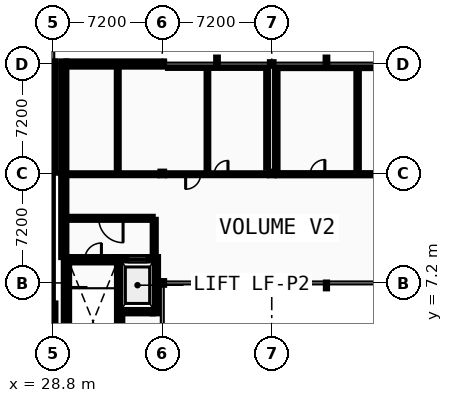
"""IFC4 building model, lengths in metres.
Left out: names, types, materials, properties, quantities, classifications, styles, units other than length and angle.
Written with IfcOpenShell. Run it as: python <this file> out.ifc"""

import sys

from ifc_helpers import new_model, si_unit, direction, frame, frame_2d, origin, origin_2d, place, context, subcontext, project, spatial, rectangle, i_section, extrude, element, fill, save


model = new_model("IFC4")
c1 = context("Model", 3, precision=1e-05, world=origin(), true_north=direction((0.0, 1.0)))
c2 = subcontext(c1, "Body", "Model", "MODEL_VIEW")
j1 = project(units=[si_unit("LENGTHUNIT", "METRE"), si_unit("PLANEANGLEUNIT", "RADIAN")], contexts=[c1])
p1 = place(None, origin())
s1 = spatial("IfcSite", under=j1, at=p1, CompositionType="ELEMENT")
p2 = place(p1, origin())
s2 = spatial("IfcBuilding", under=s1, at=p2, CompositionType="ELEMENT")
p3 = place(p2, frame((0.0, 0.0, 18.4)))
s3 = spatial("IfcBuildingStorey", under=s2, at=p3, CompositionType="ELEMENT", Elevation=18.4)
p4 = place(p3, frame((28.8, 21.6, 0.0), z_axis=(0.0, 0.0, 1.0), x_axis=(1.0, 0.0, 0.0)))
e1 = element("IfcColumn", 1, at=p4, inside=s3, PredefinedType="COLUMN", context=c2, shape_type="SweptSolid", body=[
    extrude(i_section(OverallWidth=0.3, OverallDepth=0.36, WebThickness=0.012, FlangeThickness=0.022, FilletRadius=0.027, at=origin_2d()), origin(), (0.0, 0.0, 1.0), 4.4),
])
for number, where, z_axis, x_axis in (
    (2, (29.52, 14.4, 0.0), (0.0, 0.0, 1.0), (1.0, 0.0, 0.0)),
    (3, (29.52, 21.6, 0.0), (0.0, 0.0, 1.0), (1.0, 0.0, 0.0)),
    (4, (36.0, 7.2, 0.0), (0.0, 0.0, 1.0), (1.0, 0.0, 0.0)),
    (5, (36.0, 14.4, 0.0), (0.0, 0.0, 1.0), (1.0, 0.0, 0.0)),
    (6, (36.0, 21.6, 0.0), (0.0, 0.0, 1.0), (1.0, 0.0, 0.0)),
    (7, (43.2, 7.2, 0.0), (0.0, 0.0, 1.0), (1.0, 0.0, 0.0)),
    (8, (43.2, 14.4, 0.0), (0.0, 0.0, 1.0), (1.0, 0.0, 0.0)),
    (9, (43.2, 21.6, 0.0), (0.0, 0.0, 1.0), (1.0, 0.0, 0.0)),
):
    element("IfcColumn", number, at=place(p3, frame(where, z_axis=z_axis, x_axis=x_axis)), inside=s3, PredefinedType="COLUMN", context=c2, shape_type="SweptSolid", body=[
        extrude(i_section(OverallWidth=0.24, OverallDepth=0.24, WebThickness=0.01, FlangeThickness=0.017, FilletRadius=0.021, at=origin_2d()), origin(), (0.0, 0.0, 1.0), 4.4),
    ])
p5 = place(p3, frame((28.8, -0.17, 0.0), z_axis=(0.0, 0.0, 1.0), x_axis=(0.0, 1.0, 0.0)))
e10 = element("IfcWall", 10, at=p5, inside=s3, PredefinedType="STANDARD", context=c2, shape_type="SweptSolid", body=[
    extrude(rectangle(XDim=6.02, YDim=0.34, at=frame_2d((3.01, 0.0))), origin(), (0.0, 0.0, 1.0), 4.215),
])
p6 = place(p5, frame((2.461, 0.0, 0.95)))
e11 = element("IfcOpeningElement", 11, at=p6, cuts=e10, PredefinedType="OPENING", context=c2, shape_type="SweptSolid", body=[
    extrude(rectangle(XDim=1.098, YDim=1.404, at=frame_2d((0.549, 0.702))), frame((0.0, 0.18, 0.0), z_axis=(0.0, -1.0, 0.0), x_axis=(1.0, 0.0, 0.0)), (0.0, 0.0, 1.0), 0.36),
])
p7 = place(p3, frame((28.8, 14.45, 0.0), z_axis=(0.0, 0.0, 1.0), x_axis=(0.0, 1.0, 0.0)))
e12 = element("IfcWall", 12, at=p7, inside=s3, PredefinedType="STANDARD", context=c2, shape_type="SweptSolid", body=[
    extrude(rectangle(XDim=7.15, YDim=0.34, at=frame_2d((3.575, 0.0))), origin(), (0.0, 0.0, 1.0), 4.215),
])
p8 = place(p7, frame((1.579, 0.0, 0.95)))
e13 = element("IfcOpeningElement", 13, at=p8, cuts=e12, PredefinedType="OPENING", context=c2, shape_type="SweptSolid", body=[
    extrude(rectangle(XDim=1.132, YDim=1.404, at=frame_2d((0.566, 0.702))), frame((0.0, 0.18, 0.0), z_axis=(0.0, -1.0, 0.0), x_axis=(1.0, 0.0, 0.0)), (0.0, 0.0, 1.0), 0.36),
])
p9 = place(p7, frame((4.439, 0.0, 0.95)))
e14 = element("IfcOpeningElement", 14, at=p9, cuts=e12, PredefinedType="OPENING", context=c2, shape_type="SweptSolid", body=[
    extrude(rectangle(XDim=1.132, YDim=1.404, at=frame_2d((0.566, 0.702))), frame((0.0, 0.18, 0.0), z_axis=(0.0, -1.0, 0.0), x_axis=(1.0, 0.0, 0.0)), (0.0, 0.0, 1.0), 0.36),
])
p10 = place(p3, frame((36.11, 21.6, 0.0), z_axis=(0.0, 0.0, 1.0), x_axis=(-1.0, 0.0, 0.0)))
e15 = element("IfcWall", 15, at=p10, inside=s3, PredefinedType="STANDARD", context=c2, shape_type="SweptSolid", body=[
    extrude(rectangle(XDim=6.42, YDim=0.34, at=frame_2d((3.21, 0.0))), origin(), (0.0, 0.0, 1.0), 4.035),
])
p11 = place(p3, frame((29.52, 14.4, 0.0), z_axis=(0.0, 0.0, 1.0), x_axis=(0.0, -1.0, 0.0)))
e16 = element("IfcWall", 16, at=p11, inside=s3, PredefinedType="STANDARD", context=c2, shape_type="SweptSolid", body=[
    extrude(rectangle(XDim=5.5, YDim=0.34, at=frame_2d((2.75, 0.0))), origin(), (0.0, 0.0, 1.0), 4.11),
])
p12 = place(p3, frame((29.52, 21.77, 0.0), z_axis=(0.0, 0.0, 1.0), x_axis=(0.0, -1.0, 0.0)))
e17 = element("IfcWall", 17, at=p12, inside=s3, PredefinedType="STANDARD", context=c2, shape_type="SweptSolid", body=[
    extrude(rectangle(XDim=7.37, YDim=0.34, at=frame_2d((3.685, 0.0))), origin(), (0.0, 0.0, 1.0), 4.11),
])
p13 = place(p12, frame((1.577, 0.0, 0.95)))
e18 = element("IfcOpeningElement", 18, at=p13, cuts=e17, PredefinedType="OPENING", context=c2, shape_type="SweptSolid", body=[
    extrude(rectangle(XDim=1.268, YDim=1.404, at=frame_2d((0.634, 0.702))), frame((0.0, 0.18, 0.0), z_axis=(0.0, -1.0, 0.0), x_axis=(1.0, 0.0, 0.0)), (0.0, 0.0, 1.0), 0.36),
])
p14 = place(p12, frame((4.525, 0.0, 0.95)))
e19 = element("IfcOpeningElement", 19, at=p14, cuts=e17, PredefinedType="OPENING", context=c2, shape_type="SweptSolid", body=[
    extrude(rectangle(XDim=1.268, YDim=1.404, at=frame_2d((0.634, 0.702))), frame((0.0, 0.18, 0.0), z_axis=(0.0, -1.0, 0.0), x_axis=(1.0, 0.0, 0.0)), (0.0, 0.0, 1.0), 0.36),
])
p15 = place(p3, frame((28.6, 5.85, 0.0), z_axis=(0.0, 0.0, 1.0), x_axis=(0.0, 1.0, 0.0)))
e20 = element("IfcWall", 20, at=p15, inside=s3, PredefinedType="SHEAR", context=c2, shape_type="SweptSolid", body=[
    extrude(rectangle(XDim=8.6, YDim=0.4, at=frame_2d((4.3, 0.0))), origin(), (0.0, 0.0, 1.0), 4.215),
])
p16 = place(p3, frame((29.87, 8.725, 0.0), z_axis=(0.0, 0.0, 1.0), x_axis=(1.0, 0.0, 0.0)))
e21 = element("IfcWall", 21, at=p16, inside=s3, PredefinedType="SHEAR", context=c2, shape_type="SweptSolid", body=[
    extrude(rectangle(XDim=3.15, YDim=0.35, at=frame_2d((1.575, 0.0))), origin(), (0.0, 0.0, 1.0), 4.18),
])
p17 = place(p16, frame((1.025, 0.0, 0.0)))
e22 = element("IfcOpeningElement", 22, at=p17, cuts=e21, PredefinedType="OPENING", context=c2, shape_type="SweptSolid", body=[
    extrude(rectangle(XDim=1.1, YDim=2.15, at=frame_2d((0.55, 1.075))), frame((0.0, 0.185, 0.0), z_axis=(0.0, -1.0, 0.0), x_axis=(1.0, 0.0, 0.0)), (0.0, 0.0, 1.0), 0.37),
])
p18 = place(p3, frame((29.695, 0.34, 0.0), z_axis=(0.0, 0.0, 1.0), x_axis=(0.0, 1.0, 0.0)))
e23 = element("IfcWall", 23, at=p18, inside=s3, PredefinedType="SHEAR", context=c2, shape_type="SweptSolid", body=[
    extrude(rectangle(XDim=8.56, YDim=0.35, at=frame_2d((4.28, 0.0))), origin(), (0.0, 0.0, 1.0), 4.18),
])
p19 = place(p3, frame((33.195, 0.4, 0.0), z_axis=(0.0, 0.0, 1.0), x_axis=(0.0, 1.0, 0.0)))
e24 = element("IfcWall", 24, at=p19, inside=s3, PredefinedType="SHEAR", context=c2, shape_type="SweptSolid", body=[
    extrude(rectangle(XDim=8.5, YDim=0.35, at=frame_2d((4.25, 0.0))), origin(), (0.0, 0.0, 1.0), 4.18),
])
p20 = place(p3, frame((33.37, 5.375, 0.0), z_axis=(0.0, 0.0, 1.0), x_axis=(1.0, 0.0, 0.0)))
e25 = element("IfcWall", 25, at=p20, inside=s3, PredefinedType="SHEAR", context=c2, shape_type="SweptSolid", body=[
    extrude(rectangle(XDim=2.0, YDim=0.35, at=frame_2d((1.0, 0.0))), origin(), (0.0, 0.0, 1.0), 4.18),
])
p21 = place(p3, frame((33.37, 8.725, 0.0), z_axis=(0.0, 0.0, 1.0), x_axis=(1.0, 0.0, 0.0)))
e26 = element("IfcWall", 26, at=p21, inside=s3, PredefinedType="SHEAR", context=c2, shape_type="SweptSolid", body=[
    extrude(rectangle(XDim=2.0, YDim=0.35, at=frame_2d((1.0, 0.0))), origin(), (0.0, 0.0, 1.0), 4.18),
])
p22 = place(p21, frame((0.4, 0.0, 0.0)))
e27 = element("IfcOpeningElement", 27, at=p22, cuts=e26, PredefinedType="OPENING", context=c2, shape_type="SweptSolid", body=[
    extrude(rectangle(XDim=1.2, YDim=2.2, at=frame_2d((0.6, 1.1))), frame((0.0, 0.185, 0.0), z_axis=(0.0, -1.0, 0.0), x_axis=(1.0, 0.0, 0.0)), (0.0, 0.0, 1.0), 0.37),
])
p23 = place(p3, frame((35.545, 5.2, 0.0), z_axis=(0.0, 0.0, 1.0), x_axis=(0.0, 1.0, 0.0)))
e28 = element("IfcWall", 28, at=p23, inside=s3, PredefinedType="SHEAR", context=c2, shape_type="SweptSolid", body=[
    extrude(rectangle(XDim=3.7, YDim=0.35, at=frame_2d((1.85, 0.0))), origin(), (0.0, 0.0, 1.0), 4.18),
])
p24 = place(p3, frame((29.87, 11.45, 0.0), z_axis=(0.0, 0.0, 1.0), x_axis=(1.0, 0.0, 0.0)))
e29 = element("IfcWall", 29, at=p24, inside=s3, PredefinedType="PARTITIONING", context=c2, shape_type="SweptSolid", body=[
    extrude(rectangle(XDim=5.5, YDim=0.2, at=frame_2d((2.75, 0.0))), origin(), (0.0, 0.0, 1.0), 4.18),
])
p25 = place(p24, frame((1.95, 0.0, 0.0)))
e30 = element("IfcOpeningElement", 30, at=p25, cuts=e29, PredefinedType="OPENING", context=c2, shape_type="SweptSolid", body=[
    extrude(rectangle(XDim=1.6, YDim=2.2, at=frame_2d((0.8, 1.1))), frame((0.0, 0.11, 0.0), z_axis=(0.0, -1.0, 0.0), x_axis=(1.0, 0.0, 0.0)), (0.0, 0.0, 1.0), 0.22),
])
p26 = place(p3, frame((35.47, 8.9, 0.0), z_axis=(0.0, 0.0, 1.0), x_axis=(0.0, 1.0, 0.0)))
e31 = element("IfcWall", 31, at=p26, inside=s3, PredefinedType="PARTITIONING", context=c2, shape_type="SweptSolid", body=[
    extrude(rectangle(XDim=2.45, YDim=0.2, at=frame_2d((1.225, 0.0))), origin(), (0.0, 0.0, 1.0), 4.18),
])
p27 = place(p3, frame((29.9, 14.35, 0.0), z_axis=(0.0, 0.0, 1.0), x_axis=(1.0, 0.0, 0.0)))
e32 = element("IfcWall", 32, at=p27, inside=s3, PredefinedType="PARTITIONING", context=c2, shape_type="SweptSolid", body=[
    extrude(rectangle(XDim=5.72, YDim=0.125, at=frame_2d((2.86, 0.0))), origin(), (0.0, 0.0, 1.0), 4.035),
])
p28 = place(p27, frame((1.72, 0.0, 0.0)))
e33 = element("IfcOpeningElement", 33, at=p28, cuts=e32, PredefinedType="OPENING", context=c2, shape_type="SweptSolid", body=[
    extrude(rectangle(XDim=1.0, YDim=2.1, at=frame_2d((0.5, 1.05))), frame((0.0, 0.073, 0.0), z_axis=(0.0, -1.0, 0.0), x_axis=(1.0, 0.0, 0.0)), (0.0, 0.0, 1.0), 0.145),
])
p29 = place(p3, frame((36.38, 14.35, 0.0), z_axis=(0.0, 0.0, 1.0), x_axis=(1.0, 0.0, 0.0)))
e34 = element("IfcWall", 34, at=p29, inside=s3, PredefinedType="PARTITIONING", context=c2, shape_type="SweptSolid", body=[
    extrude(rectangle(XDim=6.44, YDim=0.125, at=frame_2d((3.22, 0.0))), origin(), (0.0, 0.0, 1.0), 4.035),
])
p30 = place(p29, frame((3.04, 0.0, 0.0)))
e35 = element("IfcOpeningElement", 35, at=p30, cuts=e34, PredefinedType="OPENING", context=c2, shape_type="SweptSolid", body=[
    extrude(rectangle(XDim=0.9, YDim=2.1, at=frame_2d((0.45, 1.05))), frame((0.0, 0.073, 0.0), z_axis=(0.0, -1.0, 0.0), x_axis=(1.0, 0.0, 0.0)), (0.0, 0.0, 1.0), 0.145),
])
p31 = place(p29, frame((1.156, 0.0, 0.0)))
e36 = element("IfcOpeningElement", 36, at=p31, cuts=e34, PredefinedType="OPENING", context=c2, shape_type="SweptSolid", body=[
    extrude(rectangle(XDim=0.984, YDim=2.068, at=frame_2d((0.492, 1.034))), frame((0.0, 0.073, 0.0), z_axis=(0.0, -1.0, 0.0), x_axis=(1.0, 0.0, 0.0)), (0.0, 0.0, 1.0), 0.145),
])
p32 = place(p3, frame((43.58, 14.35, 0.0), z_axis=(0.0, 0.0, 1.0), x_axis=(1.0, 0.0, 0.0)))
e37 = element("IfcWall", 37, at=p32, inside=s3, PredefinedType="PARTITIONING", context=c2, shape_type="SweptSolid", body=[
    extrude(rectangle(XDim=6.44, YDim=0.142, at=frame_2d((3.22, 0.0))), origin(), (0.0, 0.0, 1.0), 4.035),
])
p33 = place(p32, frame((2.156, 0.0, 0.0)))
e38 = element("IfcOpeningElement", 38, at=p33, cuts=e37, PredefinedType="OPENING", context=c2, shape_type="SweptSolid", body=[
    extrude(rectangle(XDim=0.958, YDim=2.068, at=frame_2d((0.479, 1.034))), frame((0.0, 0.081, 0.0), z_axis=(0.0, -1.0, 0.0), x_axis=(1.0, 0.0, 0.0)), (0.0, 0.0, 1.0), 0.162),
])
p34 = place(p3, frame((36.38, 21.4, 0.0), z_axis=(0.0, 0.0, 1.0), x_axis=(1.0, 0.0, 0.0)))
e39 = element("IfcWall", 39, at=p34, inside=s3, PredefinedType="PARTITIONING", context=c2, shape_type="SweptSolid", body=[
    extrude(rectangle(XDim=6.44, YDim=0.11, at=frame_2d((3.22, 0.0))), origin(), (0.0, 0.0, 1.0), 4.035),
])
p35 = place(p3, frame((43.58, 21.4, 0.0), z_axis=(0.0, 0.0, 1.0), x_axis=(1.0, 0.0, 0.0)))
e40 = element("IfcWall", 40, at=p35, inside=s3, PredefinedType="PARTITIONING", context=c2, shape_type="SweptSolid", body=[
    extrude(rectangle(XDim=6.44, YDim=0.135, at=frame_2d((3.22, 0.0))), origin(), (0.0, 0.0, 1.0), 4.035),
])
p36 = place(p3, frame((33.07, 14.413, 0.0), z_axis=(0.0, 0.0, 1.0), x_axis=(0.0, 1.0, 0.0)))
e41 = element("IfcWall", 41, at=p36, inside=s3, PredefinedType="PARTITIONING", context=c2, shape_type="SweptSolid", body=[
    extrude(rectangle(XDim=6.987, YDim=0.125, at=frame_2d((3.494, 0.0))), origin(), (0.0, 0.0, 1.0), 4.18),
])
p37 = place(p3, frame((38.97, 14.413, 0.0), z_axis=(0.0, 0.0, 1.0), x_axis=(0.0, 1.0, 0.0)))
e42 = element("IfcWall", 42, at=p37, inside=s3, PredefinedType="PARTITIONING", context=c2, shape_type="SweptSolid", body=[
    extrude(rectangle(XDim=6.932, YDim=0.11, at=frame_2d((3.466, 0.0))), origin(), (0.0, 0.0, 1.0), 4.18),
])
p38 = place(p3, frame((42.9, 14.78, 0.0), z_axis=(0.0, 0.0, 1.0), x_axis=(0.0, 1.0, 0.0)))
e43 = element("IfcWall", 43, at=p38, inside=s3, PredefinedType="PARTITIONING", context=c2, shape_type="SweptSolid", body=[
    extrude(rectangle(XDim=6.44, YDim=0.125, at=frame_2d((3.22, 0.0))), origin(), (0.0, 0.0, 1.0), 4.18),
])
p39 = place(p3, frame((43.5, 14.78, 0.0), z_axis=(0.0, 0.0, 1.0), x_axis=(0.0, 1.0, 0.0)))
e44 = element("IfcWall", 44, at=p39, inside=s3, PredefinedType="PARTITIONING", context=c2, shape_type="SweptSolid", body=[
    extrude(rectangle(XDim=6.44, YDim=0.16, at=frame_2d((3.22, 0.0))), origin(), (0.0, 0.0, 1.0), 4.18),
])
p40 = place(p3, frame((48.85, 14.421, 0.0), z_axis=(0.0, 0.0, 1.0), x_axis=(0.0, 1.0, 0.0)))
e45 = element("IfcWall", 45, at=p40, inside=s3, PredefinedType="PARTITIONING", context=c2, shape_type="SweptSolid", body=[
    extrude(rectangle(XDim=6.912, YDim=0.16, at=frame_2d((3.456, 0.0))), origin(), (0.0, 0.0, 1.0), 4.18),
])
p41 = place(p8, origin())
e46 = element("IfcWindow", 46, at=p41, inside=s3, PartitioningType="SINGLE_PANEL", PredefinedType="WINDOW", context=c2, shape_type="SweptSolid", body=[
    extrude(rectangle(XDim=1.132, YDim=1.404, at=frame_2d((0.566, 0.702))), frame((0.0, 0.03, 0.0), z_axis=(0.0, -1.0, 0.0), x_axis=(1.0, 0.0, 0.0)), (0.0, 0.0, 1.0), 0.06),
])
fill(e13, e46)
p42 = place(p9, origin())
e47 = element("IfcWindow", 47, at=p42, inside=s3, PartitioningType="SINGLE_PANEL", PredefinedType="WINDOW", context=c2, shape_type="SweptSolid", body=[
    extrude(rectangle(XDim=1.132, YDim=1.404, at=frame_2d((0.566, 0.702))), frame((0.0, 0.03, 0.0), z_axis=(0.0, -1.0, 0.0), x_axis=(1.0, 0.0, 0.0)), (0.0, 0.0, 1.0), 0.06),
])
fill(e14, e47)
p43 = place(p13, origin())
e48 = element("IfcWindow", 48, at=p43, inside=s3, PartitioningType="SINGLE_PANEL", PredefinedType="WINDOW", context=c2, shape_type="SweptSolid", body=[
    extrude(rectangle(XDim=1.268, YDim=1.404, at=frame_2d((0.634, 0.702))), frame((0.0, 0.03, 0.0), z_axis=(0.0, -1.0, 0.0), x_axis=(1.0, 0.0, 0.0)), (0.0, 0.0, 1.0), 0.06),
])
fill(e18, e48)
p44 = place(p14, origin())
e49 = element("IfcWindow", 49, at=p44, inside=s3, PartitioningType="SINGLE_PANEL", PredefinedType="WINDOW", context=c2, shape_type="SweptSolid", body=[
    extrude(rectangle(XDim=1.268, YDim=1.404, at=frame_2d((0.634, 0.702))), frame((0.0, 0.03, 0.0), z_axis=(0.0, -1.0, 0.0), x_axis=(1.0, 0.0, 0.0)), (0.0, 0.0, 1.0), 0.06),
])
fill(e19, e49)
p45 = place(p17, frame((1.1, 0.0, 0.0), z_axis=(0.0, 0.0, 1.0), x_axis=(-1.0, 0.0, 0.0)))
e50 = element("IfcDoor", 50, at=p45, inside=s3, OperationType="SINGLE_SWING_RIGHT", PredefinedType="DOOR", context=c2, shape_type="SweptSolid", body=[
    extrude(rectangle(XDim=1.1, YDim=2.15, at=frame_2d((0.55, 1.075))), frame((0.0, 0.025, 0.0), z_axis=(0.0, -1.0, 0.0), x_axis=(1.0, 0.0, 0.0)), (0.0, 0.0, 1.0), 0.05),
])
fill(e22, e50)
p46 = place(p22, origin())
e51 = element("IfcDoor", 51, at=p46, inside=s3, OperationType="SLIDING_TO_RIGHT", PredefinedType="DOOR", context=c2, shape_type="SweptSolid", body=[
    extrude(rectangle(XDim=1.2, YDim=2.2, at=frame_2d((0.6, 1.1))), frame((0.0, 0.025, 0.0), z_axis=(0.0, -1.0, 0.0), x_axis=(1.0, 0.0, 0.0)), (0.0, 0.0, 1.0), 0.05),
])
fill(e27, e51)
p47 = place(p25, origin())
e52 = element("IfcDoor", 52, at=p47, inside=s3, OperationType="DOUBLE_DOOR_SINGLE_SWING", PredefinedType="DOOR", context=c2, shape_type="SweptSolid", body=[
    extrude(rectangle(XDim=1.6, YDim=2.2, at=frame_2d((0.8, 1.1))), frame((0.0, 0.025, 0.0), z_axis=(0.0, -1.0, 0.0), x_axis=(1.0, 0.0, 0.0)), (0.0, 0.0, 1.0), 0.05),
])
fill(e30, e52)
p48 = place(p28, frame((1.0, 0.0, 0.0), z_axis=(0.0, 0.0, 1.0), x_axis=(-1.0, 0.0, 0.0)))
e53 = element("IfcDoor", 53, at=p48, inside=s3, OperationType="SLIDING_TO_LEFT", PredefinedType="DOOR", context=c2, shape_type="SweptSolid", body=[
    extrude(rectangle(XDim=1.0, YDim=2.1, at=frame_2d((0.5, 1.05))), frame((0.0, 0.025, 0.0), z_axis=(0.0, -1.0, 0.0), x_axis=(1.0, 0.0, 0.0)), (0.0, 0.0, 1.0), 0.05),
])
fill(e33, e53)
p49 = place(p30, frame((0.9, 0.0, 0.0), z_axis=(0.0, 0.0, 1.0), x_axis=(-1.0, 0.0, 0.0)))
e54 = element("IfcDoor", 54, at=p49, inside=s3, OperationType="SINGLE_SWING_RIGHT", PredefinedType="DOOR", context=c2, shape_type="SweptSolid", body=[
    extrude(rectangle(XDim=0.9, YDim=2.1, at=frame_2d((0.45, 1.05))), frame((0.0, 0.025, 0.0), z_axis=(0.0, -1.0, 0.0), x_axis=(1.0, 0.0, 0.0)), (0.0, 0.0, 1.0), 0.05),
])
fill(e35, e54)
p50 = place(p33, frame((0.958, 0.0, 0.0), z_axis=(0.0, 0.0, 1.0), x_axis=(-1.0, 0.0, 0.0)))
e55 = element("IfcDoor", 55, at=p50, inside=s3, OperationType="SINGLE_SWING_RIGHT", PredefinedType="DOOR", context=c2, shape_type="SweptSolid", body=[
    extrude(rectangle(XDim=0.958, YDim=2.068, at=frame_2d((0.479, 1.034))), frame((0.0, 0.025, 0.0), z_axis=(0.0, -1.0, 0.0), x_axis=(1.0, 0.0, 0.0)), (0.0, 0.0, 1.0), 0.05),
])
fill(e38, e55)
p51 = place(p31, frame((0.984, 0.0, 0.0), z_axis=(0.0, 0.0, 1.0), x_axis=(-1.0, 0.0, 0.0)))
e56 = element("IfcDoor", 56, at=p51, inside=s3, OperationType="SINGLE_SWING_LEFT", PredefinedType="DOOR", context=c2, shape_type="SweptSolid", body=[
    extrude(rectangle(XDim=0.984, YDim=2.068, at=frame_2d((0.492, 1.034))), frame((0.0, 0.025, 0.0), z_axis=(0.0, -1.0, 0.0), x_axis=(1.0, 0.0, 0.0)), (0.0, 0.0, 1.0), 0.05),
])
fill(e36, e56)
save(model, sys.argv[1])
